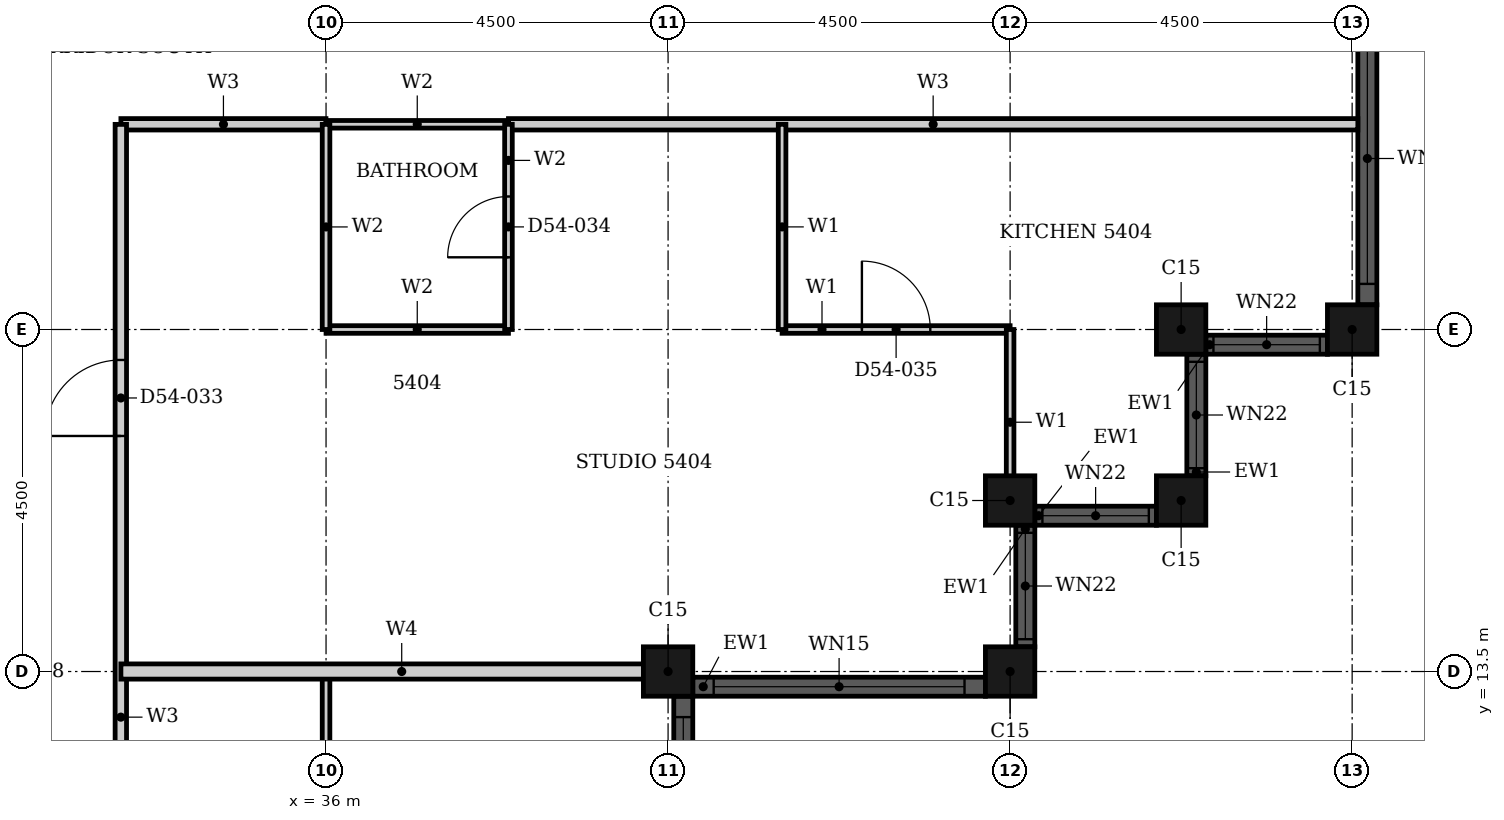
"""IFC4 building model, lengths in metres.
Left out: names, types, materials, properties, quantities, classifications, styles, units other than length and angle.
Written with IfcOpenShell. Run it as: python <this file> out.ifc"""

import sys

from ifc_helpers import new_model, si_unit, direction, frame, frame_2d, origin, origin_2d, place, context, subcontext, project, spatial, rectangle, hollow_rectangle, extrude, element, fill, save


model = new_model("IFC4")
c1 = context("Model", 3, precision=1e-05, world=origin(), true_north=direction((0.0, 1.0)))
c2 = subcontext(c1, "Body", "Model", "MODEL_VIEW")
j1 = project(units=[si_unit("LENGTHUNIT", "METRE"), si_unit("PLANEANGLEUNIT", "RADIAN")], contexts=[c1])
p1 = place(None, origin())
s1 = spatial("IfcSite", under=j1, at=p1, CompositionType="ELEMENT")
p2 = place(p1, origin())
s2 = spatial("IfcBuilding", under=s1, at=p2, CompositionType="ELEMENT")
p3 = place(p2, frame((0.0, 0.0, 214.6)))
s3 = spatial("IfcBuildingStorey", under=s2, at=p3, CompositionType="ELEMENT", Elevation=214.6)
for number, where, z_axis, x_axis in (
    (1, (40.5, 13.5, 0.0), (0.0, 0.0, 1.0), (1.0, 0.0, 0.0)),
    (2, (45.0, 13.5, 0.0), (0.0, 0.0, 1.0), (1.0, 0.0, 0.0)),
    (3, (45.0, 15.75, 0.0), (0.0, 0.0, 1.0), (1.0, 0.0, 0.0)),
    (4, (47.25, 15.75, 0.0), (0.0, 0.0, 1.0), (1.0, 0.0, 0.0)),
    (5, (47.25, 18.0, 0.0), (0.0, 0.0, 1.0), (1.0, 0.0, 0.0)),
    (6, (49.5, 18.0, 0.0), (0.0, 0.0, 1.0), (1.0, 0.0, 0.0)),
):
    element("IfcColumn", number, at=place(p3, frame(where, z_axis=z_axis, x_axis=x_axis)), inside=s3, PredefinedType="COLUMN", context=c2, shape_type="SweptSolid", body=[
        extrude(hollow_rectangle(XDim=0.65, YDim=0.65, WallThickness=0.021, at=origin_2d()), origin(), (0.0, 0.0, 1.0), 3.7),
    ])
p4 = place(p3, frame((40.825, 13.3, 0.0), z_axis=(0.0, 0.0, 1.0), x_axis=(1.0, 0.0, 0.0)))
e7 = element("IfcWall", 7, at=p4, inside=s3, PredefinedType="SOLIDWALL", context=c2, shape_type="SweptSolid", body=[
    extrude(rectangle(XDim=3.85, YDim=0.25, at=frame_2d((1.925, 0.0))), origin(), (0.0, 0.0, 1.0), 3.7),
])
p5 = place(p4, frame((0.275, 0.0, 0.45)))
e8 = element("IfcOpeningElement", 8, at=p5, cuts=e7, PredefinedType="OPENING", context=c2, shape_type="SweptSolid", body=[
    extrude(rectangle(XDim=3.3, YDim=2.3, at=frame_2d((1.65, 1.15))), frame((0.0, 0.135, 0.0), z_axis=(0.0, -1.0, 0.0), x_axis=(1.0, 0.0, 0.0)), (0.0, 0.0, 1.0), 0.27),
])
p6 = place(p3, frame((45.2, 13.825, 0.0), z_axis=(0.0, 0.0, 1.0), x_axis=(0.0, 1.0, 0.0)))
e9 = element("IfcWall", 9, at=p6, inside=s3, PredefinedType="SOLIDWALL", context=c2, shape_type="SweptSolid", body=[
    extrude(rectangle(XDim=1.6, YDim=0.25, at=frame_2d((0.8, 0.0))), origin(), (0.0, 0.0, 1.0), 3.7),
])
p7 = place(p6, frame((0.1, 0.0, 0.9)))
e10 = element("IfcOpeningElement", 10, at=p7, cuts=e9, PredefinedType="OPENING", context=c2, shape_type="SweptSolid", body=[
    extrude(rectangle(XDim=1.4, YDim=1.85, at=frame_2d((0.7, 0.925))), frame((0.0, 0.135, 0.0), z_axis=(0.0, -1.0, 0.0), x_axis=(1.0, 0.0, 0.0)), (0.0, 0.0, 1.0), 0.27),
])
p8 = place(p3, frame((45.325, 15.55, 0.0), z_axis=(0.0, 0.0, 1.0), x_axis=(1.0, 0.0, 0.0)))
e11 = element("IfcWall", 11, at=p8, inside=s3, PredefinedType="SOLIDWALL", context=c2, shape_type="SweptSolid", body=[
    extrude(rectangle(XDim=1.6, YDim=0.25, at=frame_2d((0.8, 0.0))), origin(), (0.0, 0.0, 1.0), 3.7),
])
p9 = place(p8, frame((0.1, 0.0, 0.9)))
e12 = element("IfcOpeningElement", 12, at=p9, cuts=e11, PredefinedType="OPENING", context=c2, shape_type="SweptSolid", body=[
    extrude(rectangle(XDim=1.4, YDim=1.85, at=frame_2d((0.7, 0.925))), frame((0.0, 0.135, 0.0), z_axis=(0.0, -1.0, 0.0), x_axis=(1.0, 0.0, 0.0)), (0.0, 0.0, 1.0), 0.27),
])
p10 = place(p3, frame((47.45, 16.075, 0.0), z_axis=(0.0, 0.0, 1.0), x_axis=(0.0, 1.0, 0.0)))
e13 = element("IfcWall", 13, at=p10, inside=s3, PredefinedType="SOLIDWALL", context=c2, shape_type="SweptSolid", body=[
    extrude(rectangle(XDim=1.6, YDim=0.25, at=frame_2d((0.8, 0.0))), origin(), (0.0, 0.0, 1.0), 3.7),
])
p11 = place(p10, frame((0.1, 0.0, 0.9)))
e14 = element("IfcOpeningElement", 14, at=p11, cuts=e13, PredefinedType="OPENING", context=c2, shape_type="SweptSolid", body=[
    extrude(rectangle(XDim=1.4, YDim=1.85, at=frame_2d((0.7, 0.925))), frame((0.0, 0.135, 0.0), z_axis=(0.0, -1.0, 0.0), x_axis=(1.0, 0.0, 0.0)), (0.0, 0.0, 1.0), 0.27),
])
p12 = place(p3, frame((47.575, 17.8, 0.0), z_axis=(0.0, 0.0, 1.0), x_axis=(1.0, 0.0, 0.0)))
e15 = element("IfcWall", 15, at=p12, inside=s3, PredefinedType="SOLIDWALL", context=c2, shape_type="SweptSolid", body=[
    extrude(rectangle(XDim=1.6, YDim=0.25, at=frame_2d((0.8, 0.0))), origin(), (0.0, 0.0, 1.0), 3.7),
])
p13 = place(p12, frame((0.1, 0.0, 0.9)))
e16 = element("IfcOpeningElement", 16, at=p13, cuts=e15, PredefinedType="OPENING", context=c2, shape_type="SweptSolid", body=[
    extrude(rectangle(XDim=1.4, YDim=1.85, at=frame_2d((0.7, 0.925))), frame((0.0, 0.135, 0.0), z_axis=(0.0, -1.0, 0.0), x_axis=(1.0, 0.0, 0.0)), (0.0, 0.0, 1.0), 0.27),
])
p14 = place(p3, frame((49.7, 18.325, 0.0), z_axis=(0.0, 0.0, 1.0), x_axis=(0.0, 1.0, 0.0)))
e17 = element("IfcWall", 17, at=p14, inside=s3, PredefinedType="SOLIDWALL", context=c2, shape_type="SweptSolid", body=[
    extrude(rectangle(XDim=8.35, YDim=0.25, at=frame_2d((4.175, 0.0))), origin(), (0.0, 0.0, 1.0), 3.7),
])
p15 = place(p14, frame((0.275, 0.0, 0.45)))
e18 = element("IfcOpeningElement", 18, at=p15, cuts=e17, PredefinedType="OPENING", context=c2, shape_type="SweptSolid", body=[
    extrude(rectangle(XDim=3.3, YDim=2.3, at=frame_2d((1.65, 1.15))), frame((0.0, 0.135, 0.0), z_axis=(0.0, -1.0, 0.0), x_axis=(1.0, 0.0, 0.0)), (0.0, 0.0, 1.0), 0.27),
])
p16 = place(p14, frame((4.775, 0.0, 0.45)))
e19 = element("IfcOpeningElement", 19, at=p16, cuts=e17, PredefinedType="OPENING", context=c2, shape_type="SweptSolid", body=[
    extrude(rectangle(XDim=3.3, YDim=2.3, at=frame_2d((1.65, 1.15))), frame((0.0, 0.135, 0.0), z_axis=(0.0, -1.0, 0.0), x_axis=(1.0, 0.0, 0.0)), (0.0, 0.0, 1.0), 0.27),
])
p17 = place(p3, frame((40.7, 4.825, 0.0), z_axis=(0.0, 0.0, 1.0), x_axis=(0.0, 1.0, 0.0)))
e20 = element("IfcWall", 20, at=p17, inside=s3, PredefinedType="SOLIDWALL", context=c2, shape_type="SweptSolid", body=[
    extrude(rectangle(XDim=8.35, YDim=0.25, at=frame_2d((4.175, 0.0))), origin(), (0.0, 0.0, 1.0), 3.7),
])
p18 = place(p17, frame((0.275, 0.0, 0.45)))
e21 = element("IfcOpeningElement", 21, at=p18, cuts=e20, PredefinedType="OPENING", context=c2, shape_type="SweptSolid", body=[
    extrude(rectangle(XDim=3.3, YDim=2.3, at=frame_2d((1.65, 1.15))), frame((0.0, 0.135, 0.0), z_axis=(0.0, -1.0, 0.0), x_axis=(1.0, 0.0, 0.0)), (0.0, 0.0, 1.0), 0.27),
])
p19 = place(p17, frame((4.775, 0.0, 0.45)))
e22 = element("IfcOpeningElement", 22, at=p19, cuts=e20, PredefinedType="OPENING", context=c2, shape_type="SweptSolid", body=[
    extrude(rectangle(XDim=3.3, YDim=2.3, at=frame_2d((1.65, 1.15))), frame((0.0, 0.135, 0.0), z_axis=(0.0, -1.0, 0.0), x_axis=(1.0, 0.0, 0.0)), (0.0, 0.0, 1.0), 0.27),
])
p20 = place(p3, frame((33.301, 20.7, 0.0), z_axis=(0.0, 0.0, 1.0), x_axis=(1.0, 0.0, 0.0)))
e23 = element("IfcWall", 23, at=p20, inside=s3, PredefinedType="PARTITIONING", context=c2, shape_type="SweptSolid", body=[
    extrude(rectangle(XDim=2.698, YDim=0.15, at=frame_2d((1.349, 0.0))), origin(), (0.0, 0.0, 1.0), 3.4),
])
p21 = place(p3, frame((38.4, 20.7, 0.0), z_axis=(0.0, 0.0, 1.0), x_axis=(1.0, 0.0, 0.0)))
e24 = element("IfcWall", 24, at=p21, inside=s3, PredefinedType="PARTITIONING", context=c2, shape_type="SweptSolid", body=[
    extrude(rectangle(XDim=11.175, YDim=0.15, at=frame_2d((5.587, 0.0))), origin(), (0.0, 0.0, 1.0), 3.4),
])
p22 = place(p3, frame((33.3, 6.9, 0.0), z_axis=(0.0, 0.0, 1.0), x_axis=(0.0, 1.0, 0.0)))
e25 = element("IfcWall", 25, at=p22, inside=s3, PredefinedType="PARTITIONING", context=c2, shape_type="SweptSolid", body=[
    extrude(rectangle(XDim=13.799, YDim=0.15, at=frame_2d((6.899, 0.0))), origin(), (0.0, 0.0, 1.0), 3.4),
])
p23 = place(p22, frame((9.699, 0.0, 0.0)))
e26 = element("IfcOpeningElement", 26, at=p23, cuts=e25, PredefinedType="OPENING", context=c2, shape_type="SweptSolid", body=[
    extrude(rectangle(XDim=1.0, YDim=2.2, at=frame_2d((0.5, 1.1))), frame((0.0, 0.085, 0.0), z_axis=(0.0, -1.0, 0.0), x_axis=(1.0, 0.0, 0.0)), (0.0, 0.0, 1.0), 0.17),
])
p24 = place(p22, frame((1.3, 0.0, 0.0)))
e27 = element("IfcOpeningElement", 27, at=p24, cuts=e25, PredefinedType="OPENING", context=c2, shape_type="SweptSolid", body=[
    extrude(rectangle(XDim=1.0, YDim=2.2, at=frame_2d((0.5, 1.1))), frame((0.0, 0.085, 0.0), z_axis=(0.0, -1.0, 0.0), x_axis=(1.0, 0.0, 0.0)), (0.0, 0.0, 1.0), 0.17),
])
p25 = place(p3, frame((42.0, 18.0, 0.0), z_axis=(0.0, 0.0, 1.0), x_axis=(1.0, 0.0, 0.0)))
e28 = element("IfcWall", 28, at=p25, inside=s3, PredefinedType="PARTITIONING", context=c2, shape_type="SweptSolid", body=[
    extrude(rectangle(XDim=3.0, YDim=0.1, at=frame_2d((1.5, 0.0))), origin(), (0.0, 0.0, 1.0), 3.4),
])
p26 = place(p25, frame((1.05, 0.0, 0.0)))
e29 = element("IfcOpeningElement", 29, at=p26, cuts=e28, PredefinedType="OPENING", context=c2, shape_type="SweptSolid", body=[
    extrude(rectangle(XDim=0.9, YDim=2.1, at=frame_2d((0.45, 1.05))), frame((0.0, 0.06, 0.0), z_axis=(0.0, -1.0, 0.0), x_axis=(1.0, 0.0, 0.0)), (0.0, 0.0, 1.0), 0.12),
])
p27 = place(p3, frame((36.0, 10.5, 0.0), z_axis=(0.0, 0.0, 1.0), x_axis=(0.0, 1.0, 0.0)))
e30 = element("IfcWall", 30, at=p27, inside=s3, PredefinedType="PARTITIONING", context=c2, shape_type="SweptSolid", body=[
    extrude(rectangle(XDim=3.0, YDim=0.1, at=frame_2d((1.5, 0.0))), origin(), (0.0, 0.0, 1.0), 2.68),
])
p28 = place(p27, frame((1.05, 0.0, 0.0)))
e31 = element("IfcOpeningElement", 31, at=p28, cuts=e30, PredefinedType="OPENING", context=c2, shape_type="SweptSolid", body=[
    extrude(rectangle(XDim=0.9, YDim=2.1, at=frame_2d((0.45, 1.05))), frame((0.0, 0.06, 0.0), z_axis=(0.0, -1.0, 0.0), x_axis=(1.0, 0.0, 0.0)), (0.0, 0.0, 1.0), 0.12),
])
p29 = place(p3, frame((42.0, 18.0, 0.0), z_axis=(0.0, 0.0, 1.0), x_axis=(0.0, 1.0, 0.0)))
e32 = element("IfcWall", 32, at=p29, inside=s3, PredefinedType="PARTITIONING", context=c2, shape_type="SweptSolid", body=[
    extrude(rectangle(XDim=2.7, YDim=0.1, at=frame_2d((1.35, 0.0))), origin(), (0.0, 0.0, 1.0), 3.4),
])
p30 = place(p3, frame((45.0, 15.56, 0.0), z_axis=(0.0, 0.0, 1.0), x_axis=(0.0, 1.0, 0.0)))
e33 = element("IfcWall", 33, at=p30, inside=s3, PredefinedType="PARTITIONING", context=c2, shape_type="SweptSolid", body=[
    extrude(rectangle(XDim=2.44, YDim=0.1, at=frame_2d((1.22, 0.0))), origin(), (0.0, 0.0, 1.0), 3.4),
])
p31 = place(p3, frame((33.301, 13.5, 0.0), z_axis=(0.0, 0.0, 1.0), x_axis=(1.0, 0.0, 0.0)))
e34 = element("IfcWall", 34, at=p31, inside=s3, PredefinedType="PARTITIONING", context=c2, shape_type="SweptSolid", body=[
    extrude(rectangle(XDim=7.389, YDim=0.2, at=frame_2d((3.694, 0.0))), origin(), (0.0, 0.0, 1.0), 2.48),
])
for number, where, z_axis, x_axis in (
    (35, (36.0, 18.0, 0.0), (0.0, 0.0, 1.0), (1.0, 0.0, 0.0)),
    (36, (36.0, 20.7, 0.0), (0.0, 0.0, 1.0), (1.0, 0.0, 0.0)),
):
    element("IfcWall", number, at=place(p3, frame(where, z_axis=z_axis, x_axis=x_axis)), inside=s3, PredefinedType="PARTITIONING", context=c2, shape_type="SweptSolid", body=[
        extrude(rectangle(XDim=2.4, YDim=0.1, at=frame_2d((1.2, 0.0))), origin(), (0.0, 0.0, 1.0), 3.4),
    ])
p32 = place(p3, frame((36.0, 18.0, 0.0), z_axis=(0.0, 0.0, 1.0), x_axis=(0.0, 1.0, 0.0)))
e37 = element("IfcWall", 37, at=p32, inside=s3, PredefinedType="PARTITIONING", context=c2, shape_type="SweptSolid", body=[
    extrude(rectangle(XDim=2.699, YDim=0.1, at=frame_2d((1.35, 0.0))), origin(), (0.0, 0.0, 1.0), 3.4),
])
p33 = place(p3, frame((38.4, 18.0, 0.0), z_axis=(0.0, 0.0, 1.0), x_axis=(0.0, 1.0, 0.0)))
e38 = element("IfcWall", 38, at=p33, inside=s3, PredefinedType="PARTITIONING", context=c2, shape_type="SweptSolid", body=[
    extrude(rectangle(XDim=2.7, YDim=0.1, at=frame_2d((1.35, 0.0))), origin(), (0.0, 0.0, 1.0), 3.4),
])
p34 = place(p33, frame((0.95, 0.0, 0.0)))
e39 = element("IfcOpeningElement", 39, at=p34, cuts=e38, PredefinedType="OPENING", context=c2, shape_type="SweptSolid", body=[
    extrude(rectangle(XDim=0.8, YDim=2.1, at=frame_2d((0.4, 1.05))), frame((0.0, 0.06, 0.0), z_axis=(0.0, -1.0, 0.0), x_axis=(1.0, 0.0, 0.0)), (0.0, 0.0, 1.0), 0.12),
])
p35 = place(p5, origin())
e40 = element("IfcWindow", 40, at=p35, inside=s3, PartitioningType="SINGLE_PANEL", PredefinedType="WINDOW", context=c2, shape_type="SweptSolid", body=[
    extrude(rectangle(XDim=3.3, YDim=2.3, at=frame_2d((1.65, 1.15))), frame((0.0, 0.03, 0.0), z_axis=(0.0, -1.0, 0.0), x_axis=(1.0, 0.0, 0.0)), (0.0, 0.0, 1.0), 0.06),
])
fill(e8, e40)
p36 = place(p7, origin())
e41 = element("IfcWindow", 41, at=p36, inside=s3, PartitioningType="SINGLE_PANEL", PredefinedType="WINDOW", context=c2, shape_type="SweptSolid", body=[
    extrude(rectangle(XDim=1.4, YDim=1.85, at=frame_2d((0.7, 0.925))), frame((0.0, 0.03, 0.0), z_axis=(0.0, -1.0, 0.0), x_axis=(1.0, 0.0, 0.0)), (0.0, 0.0, 1.0), 0.06),
])
fill(e10, e41)
p37 = place(p9, origin())
e42 = element("IfcWindow", 42, at=p37, inside=s3, PartitioningType="SINGLE_PANEL", PredefinedType="WINDOW", context=c2, shape_type="SweptSolid", body=[
    extrude(rectangle(XDim=1.4, YDim=1.85, at=frame_2d((0.7, 0.925))), frame((0.0, 0.03, 0.0), z_axis=(0.0, -1.0, 0.0), x_axis=(1.0, 0.0, 0.0)), (0.0, 0.0, 1.0), 0.06),
])
fill(e12, e42)
p38 = place(p11, origin())
e43 = element("IfcWindow", 43, at=p38, inside=s3, PartitioningType="SINGLE_PANEL", PredefinedType="WINDOW", context=c2, shape_type="SweptSolid", body=[
    extrude(rectangle(XDim=1.4, YDim=1.85, at=frame_2d((0.7, 0.925))), frame((0.0, 0.03, 0.0), z_axis=(0.0, -1.0, 0.0), x_axis=(1.0, 0.0, 0.0)), (0.0, 0.0, 1.0), 0.06),
])
fill(e14, e43)
p39 = place(p13, origin())
e44 = element("IfcWindow", 44, at=p39, inside=s3, PartitioningType="SINGLE_PANEL", PredefinedType="WINDOW", context=c2, shape_type="SweptSolid", body=[
    extrude(rectangle(XDim=1.4, YDim=1.85, at=frame_2d((0.7, 0.925))), frame((0.0, 0.03, 0.0), z_axis=(0.0, -1.0, 0.0), x_axis=(1.0, 0.0, 0.0)), (0.0, 0.0, 1.0), 0.06),
])
fill(e16, e44)
p40 = place(p15, origin())
e45 = element("IfcWindow", 45, at=p40, inside=s3, PartitioningType="SINGLE_PANEL", PredefinedType="WINDOW", context=c2, shape_type="SweptSolid", body=[
    extrude(rectangle(XDim=3.3, YDim=2.3, at=frame_2d((1.65, 1.15))), frame((0.0, 0.03, 0.0), z_axis=(0.0, -1.0, 0.0), x_axis=(1.0, 0.0, 0.0)), (0.0, 0.0, 1.0), 0.06),
])
fill(e18, e45)
p41 = place(p19, origin())
e46 = element("IfcWindow", 46, at=p41, inside=s3, PartitioningType="SINGLE_PANEL", PredefinedType="WINDOW", context=c2, shape_type="SweptSolid", body=[
    extrude(rectangle(XDim=3.3, YDim=2.3, at=frame_2d((1.65, 1.15))), frame((0.0, 0.03, 0.0), z_axis=(0.0, -1.0, 0.0), x_axis=(1.0, 0.0, 0.0)), (0.0, 0.0, 1.0), 0.06),
])
fill(e22, e46)
p42 = place(p23, origin())
e47 = element("IfcDoor", 47, at=p42, inside=s3, OperationType="SINGLE_SWING_LEFT", PredefinedType="DOOR", context=c2, shape_type="SweptSolid", body=[
    extrude(rectangle(XDim=1.0, YDim=2.2, at=frame_2d((0.5, 1.1))), frame((0.0, 0.025, 0.0), z_axis=(0.0, -1.0, 0.0), x_axis=(1.0, 0.0, 0.0)), (0.0, 0.0, 1.0), 0.05),
])
fill(e26, e47)
p43 = place(p34, origin())
e48 = element("IfcDoor", 48, at=p43, inside=s3, OperationType="SINGLE_SWING_RIGHT", PredefinedType="DOOR", context=c2, shape_type="SweptSolid", body=[
    extrude(rectangle(XDim=0.8, YDim=2.1, at=frame_2d((0.4, 1.05))), frame((0.0, 0.025, 0.0), z_axis=(0.0, -1.0, 0.0), x_axis=(1.0, 0.0, 0.0)), (0.0, 0.0, 1.0), 0.05),
])
fill(e39, e48)
p44 = place(p26, origin())
e49 = element("IfcDoor", 49, at=p44, inside=s3, OperationType="SINGLE_SWING_LEFT", PredefinedType="DOOR", context=c2, shape_type="SweptSolid", body=[
    extrude(rectangle(XDim=0.9, YDim=2.1, at=frame_2d((0.45, 1.05))), frame((0.0, 0.025, 0.0), z_axis=(0.0, -1.0, 0.0), x_axis=(1.0, 0.0, 0.0)), (0.0, 0.0, 1.0), 0.05),
])
fill(e29, e49)
save(model, sys.argv[1])
